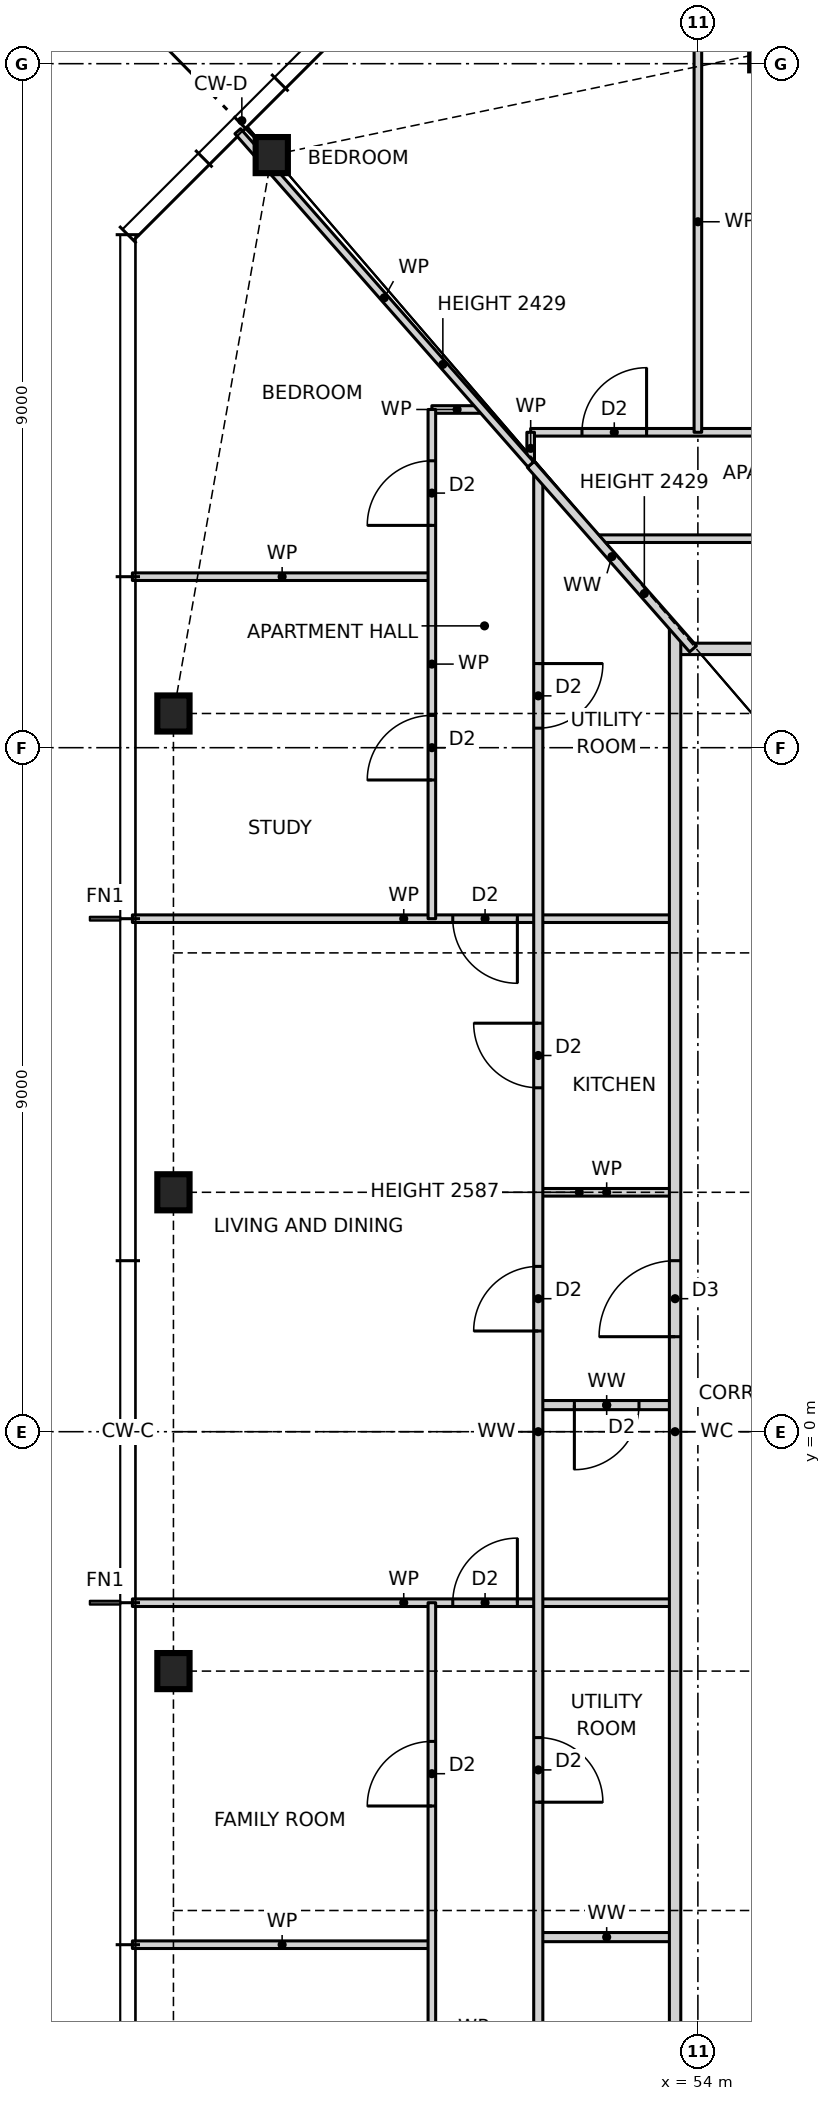
"""IFC4 building model, lengths in metres.
Left out: names, types, materials, properties, quantities, classifications, styles, units other than length and angle.
Written with IfcOpenShell. Run it as: python <this file> out.ifc"""

import sys

from ifc_helpers import new_model, si_unit, direction, frame, frame_2d, origin, origin_2d, place, context, subcontext, project, spatial, rectangle, i_section, extrude, element, fill, save


model = new_model("IFC4")
c1 = context("Model", 3, precision=1e-05, world=origin(), true_north=direction((0.0, 1.0)))
c2 = subcontext(c1, "Body", "Model", "MODEL_VIEW")
j1 = project(units=[si_unit("LENGTHUNIT", "METRE"), si_unit("PLANEANGLEUNIT", "RADIAN")], contexts=[c1])
p1 = place(None, origin())
s1 = spatial("IfcSite", under=j1, at=p1, CompositionType="ELEMENT")
p2 = place(p1, origin())
s2 = spatial("IfcBuilding", under=s1, at=p2, CompositionType="ELEMENT")
p3 = place(p2, frame((0.0, 0.0, 29.0)))
s3 = spatial("IfcBuildingStorey", under=s2, at=p3, CompositionType="ELEMENT", Elevation=29.0)
for number, where, z_axis, x_axis in (
    (1, (54.9, 18.15, 0.0), (0.0, 0.0, 1.0), (1.0, 0.0, 0.0)),
    (2, (48.394, 16.797, 0.0), (0.0, 0.0, 1.0), (1.0, 0.0, 0.0)),
    (3, (47.1, 9.45, 0.0), (0.0, 0.0, 1.0), (1.0, 0.0, 0.0)),
    (4, (47.1, 3.15, 0.0), (0.0, 0.0, 1.0), (1.0, 0.0, 0.0)),
    (5, (47.1, -3.15, 0.0), (0.0, 0.0, 1.0), (1.0, 0.0, 0.0)),
):
    element("IfcColumn", number, at=place(p3, frame(where, z_axis=z_axis, x_axis=x_axis)), inside=s3, PredefinedType="COLUMN", context=c2, shape_type="SweptSolid", body=[
        extrude(i_section(OverallWidth=0.424, OverallDepth=0.475, WebThickness=0.048, FlangeThickness=0.077, at=origin_2d()), origin(), (0.0, 0.0, 1.0), 3.5),
    ])
p4 = place(p3, frame((46.56, -6.75, 0.0), z_axis=(0.0, 0.0, 1.0), x_axis=(1.0, 0.0, 0.0)))
e6 = element("IfcWall", 6, at=p4, inside=s3, PredefinedType="PARTITIONING", context=c2, shape_type="SweptSolid", body=[
    extrude(rectangle(XDim=3.94, YDim=0.1, at=frame_2d((1.97, 0.0))), origin(), (0.0, 0.0, 1.0), 3.27),
])
p5 = place(p3, frame((51.9, -6.65, 0.0), z_axis=(0.0, 0.0, 1.0), x_axis=(1.0, 0.0, 0.0)))
e7 = element("IfcWall", 7, at=p5, inside=s3, PredefinedType="PARTITIONING", context=c2, shape_type="SweptSolid", body=[
    extrude(rectangle(XDim=1.8, YDim=0.12, at=frame_2d((0.9, 0.0))), origin(), (0.0, 0.0, 1.0), 3.27),
])
p6 = place(p3, frame((46.56, -2.25, 0.0), z_axis=(0.0, 0.0, 1.0), x_axis=(1.0, 0.0, 0.0)))
e8 = element("IfcWall", 8, at=p6, inside=s3, PredefinedType="PARTITIONING", context=c2, shape_type="SweptSolid", body=[
    extrude(rectangle(XDim=7.14, YDim=0.1, at=frame_2d((3.57, 0.0))), origin(), (0.0, 0.0, 1.0), 3.27),
])
p7 = place(p6, frame((4.215, 0.0, 0.0)))
e9 = element("IfcOpeningElement", 9, at=p7, cuts=e8, PredefinedType="OPENING", context=c2, shape_type="SweptSolid", body=[
    extrude(rectangle(XDim=0.85, YDim=2.1, at=frame_2d((0.425, 1.05))), frame((0.0, 0.06, 0.0), z_axis=(0.0, -1.0, 0.0), x_axis=(1.0, 0.0, 0.0)), (0.0, 0.0, 1.0), 0.12),
])
p8 = place(p3, frame((51.9, 0.35, 0.0), z_axis=(0.0, 0.0, 1.0), x_axis=(1.0, 0.0, 0.0)))
e10 = element("IfcWall", 10, at=p8, inside=s3, PredefinedType="PARTITIONING", context=c2, shape_type="SweptSolid", body=[
    extrude(rectangle(XDim=1.8, YDim=0.12, at=frame_2d((0.9, 0.0))), origin(), (0.0, 0.0, 1.0), 3.27),
])
p9 = place(p8, frame((0.475, 0.0, 0.0)))
e11 = element("IfcOpeningElement", 11, at=p9, cuts=e10, PredefinedType="OPENING", context=c2, shape_type="SweptSolid", body=[
    extrude(rectangle(XDim=0.85, YDim=2.1, at=frame_2d((0.425, 1.05))), frame((0.0, 0.07, 0.0), z_axis=(0.0, -1.0, 0.0), x_axis=(1.0, 0.0, 0.0)), (0.0, 0.0, 1.0), 0.14),
])
p10 = place(p3, frame((51.9, 3.15, 0.0), z_axis=(0.0, 0.0, 1.0), x_axis=(1.0, 0.0, 0.0)))
e12 = element("IfcWall", 12, at=p10, inside=s3, PredefinedType="PARTITIONING", context=c2, shape_type="SweptSolid", body=[
    extrude(rectangle(XDim=1.8, YDim=0.1, at=frame_2d((0.9, 0.0))), origin(), (0.0, 0.0, 1.0), 2.587),
])
p11 = place(p3, frame((46.56, 6.75, 0.0), z_axis=(0.0, 0.0, 1.0), x_axis=(1.0, 0.0, 0.0)))
e13 = element("IfcWall", 13, at=p11, inside=s3, PredefinedType="PARTITIONING", context=c2, shape_type="SweptSolid", body=[
    extrude(rectangle(XDim=7.14, YDim=0.1, at=frame_2d((3.57, 0.0))), origin(), (0.0, 0.0, 1.0), 3.27),
])
p12 = place(p11, frame((4.215, 0.0, 0.0)))
e14 = element("IfcOpeningElement", 14, at=p12, cuts=e13, PredefinedType="OPENING", context=c2, shape_type="SweptSolid", body=[
    extrude(rectangle(XDim=0.85, YDim=2.1, at=frame_2d((0.425, 1.05))), frame((0.0, 0.06, 0.0), z_axis=(0.0, -1.0, 0.0), x_axis=(1.0, 0.0, 0.0)), (0.0, 0.0, 1.0), 0.12),
])
p13 = place(p3, frame((53.7, 10.3, 0.0), z_axis=(0.0, 0.0, 1.0), x_axis=(1.0, 0.0, 0.0)))
e15 = element("IfcWall", 15, at=p13, inside=s3, PredefinedType="PARTITIONING", context=c2, shape_type="SweptSolid", body=[
    extrude(rectangle(XDim=18.6, YDim=0.15, at=frame_2d((9.3, 0.0))), origin(), (0.0, 0.0, 1.0), 3.27),
])
p14 = place(p13, frame((8.3, 0.0, 0.0)))
e16 = element("IfcOpeningElement", 16, at=p14, cuts=e15, PredefinedType="OPENING", context=c2, shape_type="SweptSolid", body=[
    extrude(rectangle(XDim=1.0, YDim=2.1, at=frame_2d((0.5, 1.05))), frame((0.0, 0.085, 0.0), z_axis=(0.0, -1.0, 0.0), x_axis=(1.0, 0.0, 0.0)), (0.0, 0.0, 1.0), 0.17),
])
p15 = place(p3, frame((46.56, 11.25, 0.0), z_axis=(0.0, 0.0, 1.0), x_axis=(1.0, 0.0, 0.0)))
e17 = element("IfcWall", 17, at=p15, inside=s3, PredefinedType="PARTITIONING", context=c2, shape_type="SweptSolid", body=[
    extrude(rectangle(XDim=3.94, YDim=0.1, at=frame_2d((1.97, 0.0))), origin(), (0.0, 0.0, 1.0), 3.27),
])
p16 = place(p3, frame((52.66, 11.75, 0.0), z_axis=(0.0, 0.0, 1.0), x_axis=(1.0, 0.0, 0.0)))
e18 = element("IfcWall", 18, at=p16, inside=s3, PredefinedType="PARTITIONING", context=c2, shape_type="SweptSolid", body=[
    extrude(rectangle(XDim=20.68, YDim=0.1, at=frame_2d((10.34, 0.0))), origin(), (0.0, 0.0, 1.0), 3.27),
])
p17 = place(p16, frame((12.615, 0.0, 0.0)))
e19 = element("IfcOpeningElement", 19, at=p17, cuts=e18, PredefinedType="OPENING", context=c2, shape_type="SweptSolid", body=[
    extrude(rectangle(XDim=0.85, YDim=2.1, at=frame_2d((0.425, 1.05))), frame((0.0, 0.06, 0.0), z_axis=(0.0, -1.0, 0.0), x_axis=(1.0, 0.0, 0.0)), (0.0, 0.0, 1.0), 0.12),
])
p18 = place(p16, frame((9.415, 0.0, 0.0)))
e20 = element("IfcOpeningElement", 20, at=p18, cuts=e18, PredefinedType="OPENING", context=c2, shape_type="SweptSolid", body=[
    extrude(rectangle(XDim=0.85, YDim=2.1, at=frame_2d((0.425, 1.05))), frame((0.0, 0.06, 0.0), z_axis=(0.0, -1.0, 0.0), x_axis=(1.0, 0.0, 0.0)), (0.0, 0.0, 1.0), 0.12),
])
p19 = place(p16, frame((17.335, 0.0, 0.0)))
e21 = element("IfcOpeningElement", 21, at=p19, cuts=e18, PredefinedType="OPENING", context=c2, shape_type="SweptSolid", body=[
    extrude(rectangle(XDim=0.85, YDim=2.1, at=frame_2d((0.425, 1.05))), frame((0.0, 0.06, 0.0), z_axis=(0.0, -1.0, 0.0), x_axis=(1.0, 0.0, 0.0)), (0.0, 0.0, 1.0), 0.12),
])
p20 = place(p16, frame((2.495, 0.0, 0.0)))
e22 = element("IfcOpeningElement", 22, at=p20, cuts=e18, PredefinedType="OPENING", context=c2, shape_type="SweptSolid", body=[
    extrude(rectangle(XDim=0.85, YDim=2.1, at=frame_2d((0.425, 1.05))), frame((0.0, 0.06, 0.0), z_axis=(0.0, -1.0, 0.0), x_axis=(1.0, 0.0, 0.0)), (0.0, 0.0, 1.0), 0.12),
])
p21 = place(p3, frame((51.8, 13.15, 0.0), z_axis=(0.0, 0.0, 1.0), x_axis=(1.0, 0.0, 0.0)))
e23 = element("IfcWall", 23, at=p21, inside=s3, PredefinedType="PARTITIONING", context=c2, shape_type="SweptSolid", body=[
    extrude(rectangle(XDim=6.7, YDim=0.1, at=frame_2d((3.35, 0.0))), origin(), (0.0, 0.0, 1.0), 3.27),
])
p22 = place(p21, frame((4.025, 0.0, 0.0)))
e24 = element("IfcOpeningElement", 24, at=p22, cuts=e23, PredefinedType="OPENING", context=c2, shape_type="SweptSolid", body=[
    extrude(rectangle(XDim=0.85, YDim=2.1, at=frame_2d((0.425, 1.05))), frame((0.0, 0.06, 0.0), z_axis=(0.0, -1.0, 0.0), x_axis=(1.0, 0.0, 0.0)), (0.0, 0.0, 1.0), 0.12),
])
p23 = place(p21, frame((0.675, 0.0, 0.0)))
e25 = element("IfcOpeningElement", 25, at=p23, cuts=e23, PredefinedType="OPENING", context=c2, shape_type="SweptSolid", body=[
    extrude(rectangle(XDim=0.85, YDim=2.1, at=frame_2d((0.425, 1.05))), frame((0.0, 0.06, 0.0), z_axis=(0.0, -1.0, 0.0), x_axis=(1.0, 0.0, 0.0)), (0.0, 0.0, 1.0), 0.12),
])
p24 = place(p3, frame((50.5, 13.45, 0.0), z_axis=(0.0, 0.0, 1.0), x_axis=(1.0, 0.0, 0.0)))
e26 = element("IfcWall", 26, at=p24, inside=s3, PredefinedType="PARTITIONING", context=c2, shape_type="SweptSolid", body=[
    extrude(rectangle(XDim=0.664, YDim=0.1, at=frame_2d((0.332, 0.0))), origin(), (0.0, 0.0, 1.0), 3.27),
])
p25 = place(p3, frame((54.0, 13.15, 0.0), z_axis=(0.0, 0.0, 1.0), x_axis=(0.0, 1.0, 0.0)))
e27 = element("IfcWall", 27, at=p25, inside=s3, PredefinedType="PARTITIONING", context=c2, shape_type="SweptSolid", body=[
    extrude(rectangle(XDim=5.54, YDim=0.1, at=frame_2d((2.77, 0.0))), origin(), (0.0, 0.0, 1.0), 3.27),
])
p26 = place(p3, frame((53.7, -10.568, 0.0), z_axis=(0.0, 0.0, 1.0), x_axis=(0.0, 1.0, 0.0)))
e28 = element("IfcWall", 28, at=p26, inside=s3, PredefinedType="PARTITIONING", context=c2, shape_type="SweptSolid", body=[
    extrude(rectangle(XDim=21.136, YDim=0.15, at=frame_2d((10.568, 0.0))), origin(), (0.0, 0.0, 1.0), 3.27),
])
p27 = place(p26, frame((11.818, 0.0, 0.0)))
e29 = element("IfcOpeningElement", 29, at=p27, cuts=e28, PredefinedType="OPENING", context=c2, shape_type="SweptSolid", body=[
    extrude(rectangle(XDim=1.0, YDim=2.1, at=frame_2d((0.5, 1.05))), frame((0.0, 0.085, 0.0), z_axis=(0.0, -1.0, 0.0), x_axis=(1.0, 0.0, 0.0)), (0.0, 0.0, 1.0), 0.17),
])
p28 = place(p3, frame((51.9, -12.614, 0.0), z_axis=(0.0, 0.0, 1.0), x_axis=(0.0, 1.0, 0.0)))
e30 = element("IfcWall", 30, at=p28, inside=s3, PredefinedType="PARTITIONING", context=c2, shape_type="SweptSolid", body=[
    extrude(rectangle(XDim=25.228, YDim=0.12, at=frame_2d((12.614, 0.0))), origin(), (0.0, 0.0, 1.0), 3.27),
])
p29 = place(p28, frame((17.139, 0.0, 0.0)))
e31 = element("IfcOpeningElement", 31, at=p29, cuts=e30, PredefinedType="OPENING", context=c2, shape_type="SweptSolid", body=[
    extrude(rectangle(XDim=0.85, YDim=2.1, at=frame_2d((0.425, 1.05))), frame((0.0, 0.07, 0.0), z_axis=(0.0, -1.0, 0.0), x_axis=(1.0, 0.0, 0.0)), (0.0, 0.0, 1.0), 0.14),
])
p30 = place(p28, frame((13.939, 0.0, 0.0)))
e32 = element("IfcOpeningElement", 32, at=p30, cuts=e30, PredefinedType="OPENING", context=c2, shape_type="SweptSolid", body=[
    extrude(rectangle(XDim=0.85, YDim=2.1, at=frame_2d((0.425, 1.05))), frame((0.0, 0.07, 0.0), z_axis=(0.0, -1.0, 0.0), x_axis=(1.0, 0.0, 0.0)), (0.0, 0.0, 1.0), 0.14),
])
p31 = place(p28, frame((21.871, 0.0, 0.0)))
e33 = element("IfcOpeningElement", 33, at=p31, cuts=e30, PredefinedType="OPENING", context=c2, shape_type="SweptSolid", body=[
    extrude(rectangle(XDim=0.85, YDim=2.1, at=frame_2d((0.425, 1.05))), frame((0.0, 0.07, 0.0), z_axis=(0.0, -1.0, 0.0), x_axis=(1.0, 0.0, 0.0)), (0.0, 0.0, 1.0), 0.14),
])
p32 = place(p28, frame((7.739, 0.0, 0.0)))
e34 = element("IfcOpeningElement", 34, at=p32, cuts=e30, PredefinedType="OPENING", context=c2, shape_type="SweptSolid", body=[
    extrude(rectangle(XDim=0.85, YDim=2.1, at=frame_2d((0.425, 1.05))), frame((0.0, 0.07, 0.0), z_axis=(0.0, -1.0, 0.0), x_axis=(1.0, 0.0, 0.0)), (0.0, 0.0, 1.0), 0.14),
])
p33 = place(p28, frame((2.557, 0.0, 0.0)))
e35 = element("IfcOpeningElement", 35, at=p33, cuts=e30, PredefinedType="OPENING", context=c2, shape_type="SweptSolid", body=[
    extrude(rectangle(XDim=0.85, YDim=2.1, at=frame_2d((0.425, 1.05))), frame((0.0, 0.07, 0.0), z_axis=(0.0, -1.0, 0.0), x_axis=(1.0, 0.0, 0.0)), (0.0, 0.0, 1.0), 0.14),
])
p34 = place(p3, frame((51.8, 12.727, 0.0), z_axis=(0.0, 0.0, 1.0), x_axis=(0.0, 1.0, 0.0)))
e36 = element("IfcWall", 36, at=p34, inside=s3, PredefinedType="PARTITIONING", context=c2, shape_type="SweptSolid", body=[
    extrude(rectangle(XDim=0.423, YDim=0.1, at=frame_2d((0.211, 0.0))), origin(), (0.0, 0.0, 1.0), 3.27),
])
p35 = place(p3, frame((50.5, -13.45, 0.0), z_axis=(0.0, 0.0, 1.0), x_axis=(0.0, 1.0, 0.0)))
e37 = element("IfcWall", 37, at=p35, inside=s3, PredefinedType="PARTITIONING", context=c2, shape_type="SweptSolid", body=[
    extrude(rectangle(XDim=11.2, YDim=0.1, at=frame_2d((5.6, 0.0))), origin(), (0.0, 0.0, 1.0), 3.27),
])
p36 = place(p35, frame((8.525, 0.0, 0.0)))
e38 = element("IfcOpeningElement", 38, at=p36, cuts=e37, PredefinedType="OPENING", context=c2, shape_type="SweptSolid", body=[
    extrude(rectangle(XDim=0.85, YDim=2.1, at=frame_2d((0.425, 1.05))), frame((0.0, 0.06, 0.0), z_axis=(0.0, -1.0, 0.0), x_axis=(1.0, 0.0, 0.0)), (0.0, 0.0, 1.0), 0.12),
])
p37 = place(p35, frame((4.025, 0.0, 0.0)))
e39 = element("IfcOpeningElement", 39, at=p37, cuts=e37, PredefinedType="OPENING", context=c2, shape_type="SweptSolid", body=[
    extrude(rectangle(XDim=0.85, YDim=2.1, at=frame_2d((0.425, 1.05))), frame((0.0, 0.06, 0.0), z_axis=(0.0, -1.0, 0.0), x_axis=(1.0, 0.0, 0.0)), (0.0, 0.0, 1.0), 0.12),
])
p38 = place(p35, frame((0.675, 0.0, 0.0)))
e40 = element("IfcOpeningElement", 40, at=p38, cuts=e37, PredefinedType="OPENING", context=c2, shape_type="SweptSolid", body=[
    extrude(rectangle(XDim=0.85, YDim=2.1, at=frame_2d((0.425, 1.05))), frame((0.0, 0.06, 0.0), z_axis=(0.0, -1.0, 0.0), x_axis=(1.0, 0.0, 0.0)), (0.0, 0.0, 1.0), 0.12),
])
p39 = place(p3, frame((50.5, 6.75, 0.0), z_axis=(0.0, 0.0, 1.0), x_axis=(0.0, 1.0, 0.0)))
e41 = element("IfcWall", 41, at=p39, inside=s3, PredefinedType="PARTITIONING", context=c2, shape_type="SweptSolid", body=[
    extrude(rectangle(XDim=6.7, YDim=0.1, at=frame_2d((3.35, 0.0))), origin(), (0.0, 0.0, 1.0), 3.27),
])
p40 = place(p39, frame((1.825, 0.0, 0.0)))
e42 = element("IfcOpeningElement", 42, at=p40, cuts=e41, PredefinedType="OPENING", context=c2, shape_type="SweptSolid", body=[
    extrude(rectangle(XDim=0.85, YDim=2.1, at=frame_2d((0.425, 1.05))), frame((0.0, 0.06, 0.0), z_axis=(0.0, -1.0, 0.0), x_axis=(1.0, 0.0, 0.0)), (0.0, 0.0, 1.0), 0.12),
])
p41 = place(p39, frame((5.175, 0.0, 0.0)))
e43 = element("IfcOpeningElement", 43, at=p41, cuts=e41, PredefinedType="OPENING", context=c2, shape_type="SweptSolid", body=[
    extrude(rectangle(XDim=0.85, YDim=2.1, at=frame_2d((0.425, 1.05))), frame((0.0, 0.06, 0.0), z_axis=(0.0, -1.0, 0.0), x_axis=(1.0, 0.0, 0.0)), (0.0, 0.0, 1.0), 0.12),
])
p42 = place(p3, frame((53.936, 10.3, 0.0), z_axis=(0.0, 0.0, 1.0), x_axis=(-0.660384426006, 0.750927699508, 0.0)))
e44 = element("IfcWall", 44, at=p42, inside=s3, PredefinedType="PARTITIONING", context=c2, shape_type="SweptSolid", body=[
    extrude(rectangle(XDim=3.233, YDim=0.12, at=frame_2d((1.616, 0.0))), origin(), (0.0, 0.0, 1.0), 2.429),
])
p43 = place(p3, frame((51.801, 12.728, 0.0), z_axis=(0.0, 0.0, 1.0), x_axis=(-0.660356300202, 0.750952433103, 0.0)))
e45 = element("IfcWall", 45, at=p43, inside=s3, PredefinedType="PARTITIONING", context=c2, shape_type="SweptSolid", body=[
    extrude(rectangle(XDim=5.837, YDim=0.1, at=frame_2d((2.918, 0.0))), origin(), (0.0, 0.0, 1.0), 2.429),
])
p44 = place(p23, origin())
e46 = element("IfcDoor", 46, at=p44, inside=s3, OperationType="SINGLE_SWING_RIGHT", PredefinedType="DOOR", context=c2, shape_type="SweptSolid", body=[
    extrude(rectangle(XDim=0.85, YDim=2.1, at=frame_2d((0.425, 1.05))), frame((0.0, 0.025, 0.0), z_axis=(0.0, -1.0, 0.0), x_axis=(1.0, 0.0, 0.0)), (0.0, 0.0, 1.0), 0.05),
])
fill(e25, e46)
p45 = place(p29, origin())
e47 = element("IfcDoor", 47, at=p45, inside=s3, OperationType="SINGLE_SWING_RIGHT", PredefinedType="DOOR", context=c2, shape_type="SweptSolid", body=[
    extrude(rectangle(XDim=0.85, YDim=2.1, at=frame_2d((0.425, 1.05))), frame((0.0, 0.025, 0.0), z_axis=(0.0, -1.0, 0.0), x_axis=(1.0, 0.0, 0.0)), (0.0, 0.0, 1.0), 0.05),
])
fill(e31, e47)
p46 = place(p27, origin())
e48 = element("IfcDoor", 48, at=p46, inside=s3, OperationType="SINGLE_SWING_LEFT", PredefinedType="DOOR", context=c2, shape_type="SweptSolid", body=[
    extrude(rectangle(XDim=1.0, YDim=2.1, at=frame_2d((0.5, 1.05))), frame((0.0, 0.025, 0.0), z_axis=(0.0, -1.0, 0.0), x_axis=(1.0, 0.0, 0.0)), (0.0, 0.0, 1.0), 0.05),
])
fill(e29, e48)
p47 = place(p30, origin())
e49 = element("IfcDoor", 49, at=p47, inside=s3, OperationType="SINGLE_SWING_LEFT", PredefinedType="DOOR", context=c2, shape_type="SweptSolid", body=[
    extrude(rectangle(XDim=0.85, YDim=2.1, at=frame_2d((0.425, 1.05))), frame((0.0, 0.025, 0.0), z_axis=(0.0, -1.0, 0.0), x_axis=(1.0, 0.0, 0.0)), (0.0, 0.0, 1.0), 0.05),
])
fill(e32, e49)
p48 = place(p9, frame((0.85, 0.0, 0.0), z_axis=(0.0, 0.0, 1.0), x_axis=(-1.0, 0.0, 0.0)))
e50 = element("IfcDoor", 50, at=p48, inside=s3, OperationType="SINGLE_SWING_RIGHT", PredefinedType="DOOR", context=c2, shape_type="SweptSolid", body=[
    extrude(rectangle(XDim=0.85, YDim=2.1, at=frame_2d((0.425, 1.05))), frame((0.0, 0.025, 0.0), z_axis=(0.0, -1.0, 0.0), x_axis=(1.0, 0.0, 0.0)), (0.0, 0.0, 1.0), 0.05),
])
fill(e11, e50)
p49 = place(p12, frame((0.85, 0.0, 0.0), z_axis=(0.0, 0.0, 1.0), x_axis=(-1.0, 0.0, 0.0)))
e51 = element("IfcDoor", 51, at=p49, inside=s3, OperationType="SINGLE_SWING_LEFT", PredefinedType="DOOR", context=c2, shape_type="SweptSolid", body=[
    extrude(rectangle(XDim=0.85, YDim=2.1, at=frame_2d((0.425, 1.05))), frame((0.0, 0.025, 0.0), z_axis=(0.0, -1.0, 0.0), x_axis=(1.0, 0.0, 0.0)), (0.0, 0.0, 1.0), 0.05),
])
fill(e14, e51)
p50 = place(p40, origin())
e52 = element("IfcDoor", 52, at=p50, inside=s3, OperationType="SINGLE_SWING_LEFT", PredefinedType="DOOR", context=c2, shape_type="SweptSolid", body=[
    extrude(rectangle(XDim=0.85, YDim=2.1, at=frame_2d((0.425, 1.05))), frame((0.0, 0.025, 0.0), z_axis=(0.0, -1.0, 0.0), x_axis=(1.0, 0.0, 0.0)), (0.0, 0.0, 1.0), 0.05),
])
fill(e42, e52)
p51 = place(p41, origin())
e53 = element("IfcDoor", 53, at=p51, inside=s3, OperationType="SINGLE_SWING_LEFT", PredefinedType="DOOR", context=c2, shape_type="SweptSolid", body=[
    extrude(rectangle(XDim=0.85, YDim=2.1, at=frame_2d((0.425, 1.05))), frame((0.0, 0.025, 0.0), z_axis=(0.0, -1.0, 0.0), x_axis=(1.0, 0.0, 0.0)), (0.0, 0.0, 1.0), 0.05),
])
fill(e43, e53)
p52 = place(p31, frame((0.85, 0.0, 0.0), z_axis=(0.0, 0.0, 1.0), x_axis=(-1.0, 0.0, 0.0)))
e54 = element("IfcDoor", 54, at=p52, inside=s3, OperationType="SINGLE_SWING_LEFT", PredefinedType="DOOR", context=c2, shape_type="SweptSolid", body=[
    extrude(rectangle(XDim=0.85, YDim=2.1, at=frame_2d((0.425, 1.05))), frame((0.0, 0.025, 0.0), z_axis=(0.0, -1.0, 0.0), x_axis=(1.0, 0.0, 0.0)), (0.0, 0.0, 1.0), 0.05),
])
fill(e33, e54)
p53 = place(p7, origin())
e55 = element("IfcDoor", 55, at=p53, inside=s3, OperationType="SINGLE_SWING_RIGHT", PredefinedType="DOOR", context=c2, shape_type="SweptSolid", body=[
    extrude(rectangle(XDim=0.85, YDim=2.1, at=frame_2d((0.425, 1.05))), frame((0.0, 0.025, 0.0), z_axis=(0.0, -1.0, 0.0), x_axis=(1.0, 0.0, 0.0)), (0.0, 0.0, 1.0), 0.05),
])
fill(e9, e55)
p54 = place(p36, origin())
e56 = element("IfcDoor", 56, at=p54, inside=s3, OperationType="SINGLE_SWING_LEFT", PredefinedType="DOOR", context=c2, shape_type="SweptSolid", body=[
    extrude(rectangle(XDim=0.85, YDim=2.1, at=frame_2d((0.425, 1.05))), frame((0.0, 0.025, 0.0), z_axis=(0.0, -1.0, 0.0), x_axis=(1.0, 0.0, 0.0)), (0.0, 0.0, 1.0), 0.05),
])
fill(e38, e56)
p55 = place(p32, frame((0.85, 0.0, 0.0), z_axis=(0.0, 0.0, 1.0), x_axis=(-1.0, 0.0, 0.0)))
e57 = element("IfcDoor", 57, at=p55, inside=s3, OperationType="SINGLE_SWING_RIGHT", PredefinedType="DOOR", context=c2, shape_type="SweptSolid", body=[
    extrude(rectangle(XDim=0.85, YDim=2.1, at=frame_2d((0.425, 1.05))), frame((0.0, 0.025, 0.0), z_axis=(0.0, -1.0, 0.0), x_axis=(1.0, 0.0, 0.0)), (0.0, 0.0, 1.0), 0.05),
])
fill(e34, e57)
save(model, sys.argv[1])
